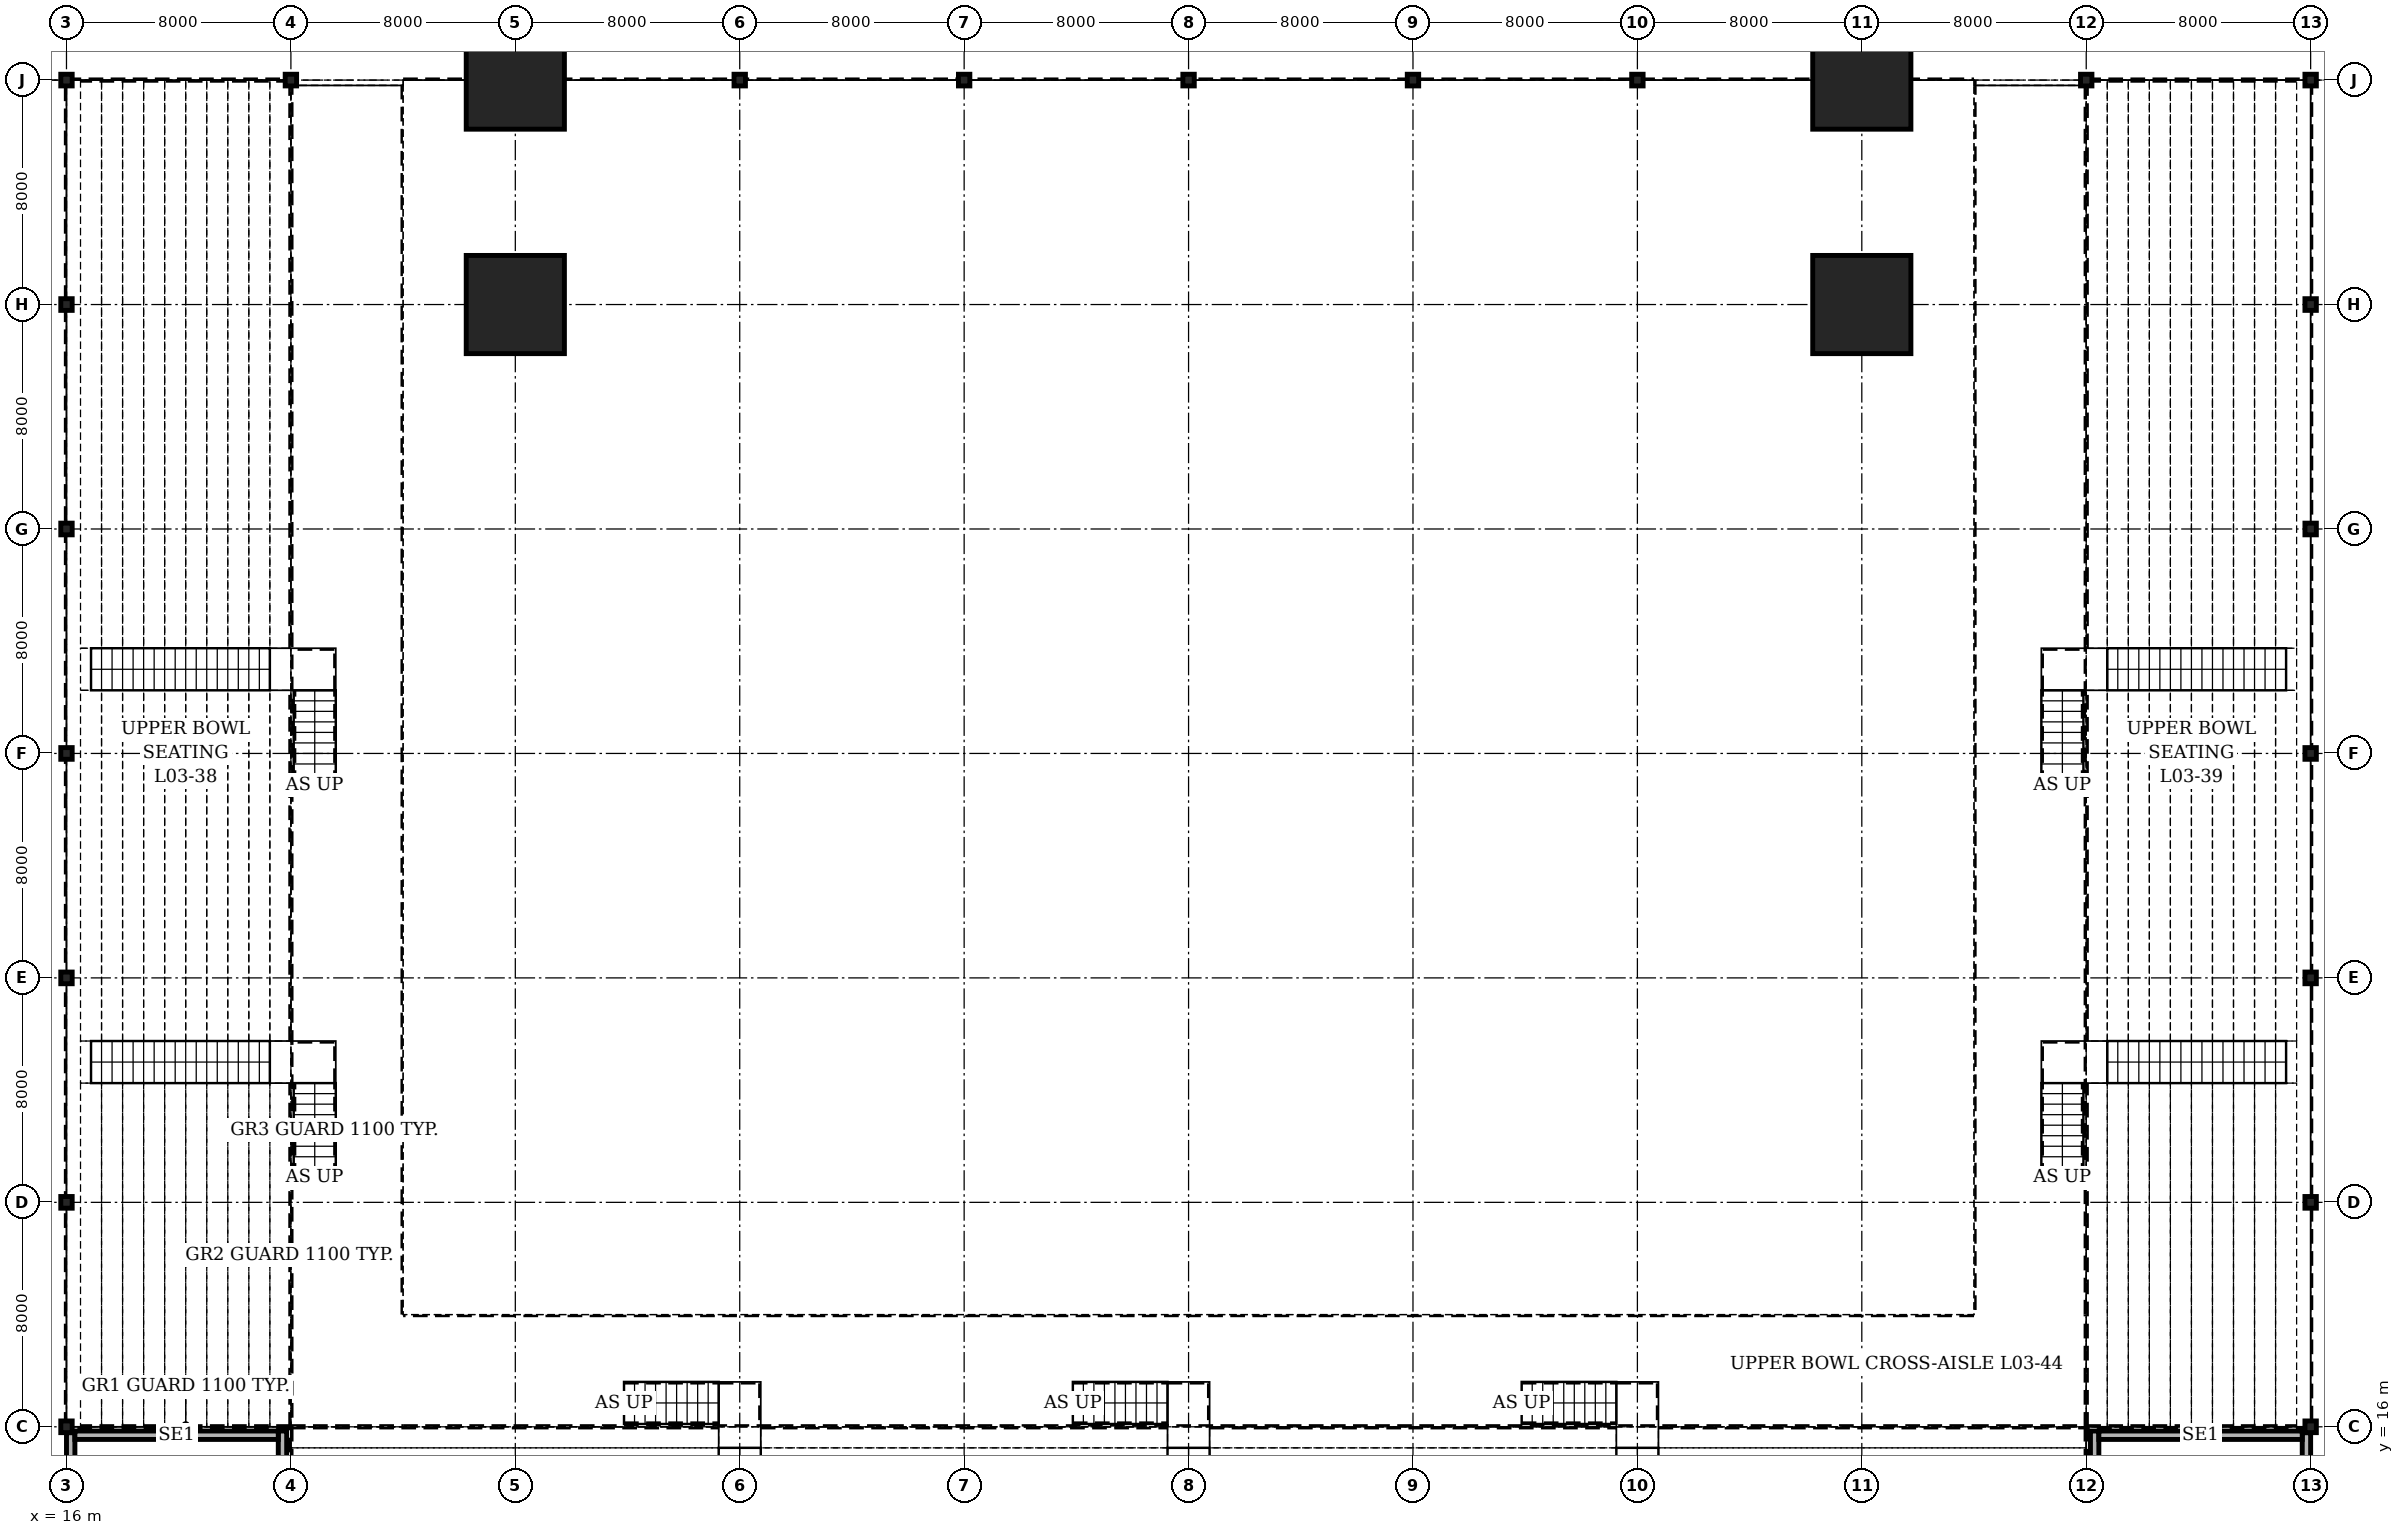
"""IFC4 building model, lengths in metres.
Left out: names, types, materials, properties, quantities, classifications, styles, units other than length and angle.
Written with IfcOpenShell. Run it as: python <this file> out.ifc"""

import sys

from ifc_helpers import new_model, si_unit, direction, frame, frame_2d, origin, origin_2d, place, context, subcontext, project, spatial, rectangle, hollow_rectangle, i_section, extrude, element, save


model = new_model("IFC4")
c1 = context("Model", 3, precision=1e-05, world=origin(), true_north=direction((0.0, 1.0)))
c2 = subcontext(c1, "Body", "Model", "MODEL_VIEW")
j1 = project(units=[si_unit("LENGTHUNIT", "METRE"), si_unit("PLANEANGLEUNIT", "RADIAN")], contexts=[c1])
p1 = place(None, origin())
s1 = spatial("IfcSite", under=j1, at=p1, CompositionType="ELEMENT")
p2 = place(p1, origin())
s2 = spatial("IfcBuilding", under=s1, at=p2, CompositionType="ELEMENT")
p3 = place(p2, frame((0.0, 0.0, 14.9)))
s3 = spatial("IfcBuildingStorey", under=s2, at=p3, CompositionType="ELEMENT", Elevation=14.9)
for number, where, z_axis, x_axis in (
    (1, (16.0, 16.0, 0.0), (0.0, 0.0, 1.0), (1.0, 0.0, 0.0)),
    (2, (16.0, 24.0, 0.0), (0.0, 0.0, 1.0), (1.0, 0.0, 0.0)),
    (3, (16.0, 32.0, 0.0), (0.0, 0.0, 1.0), (1.0, 0.0, 0.0)),
    (4, (16.0, 40.0, 0.0), (0.0, 0.0, 1.0), (1.0, 0.0, 0.0)),
    (5, (16.0, 48.0, 0.0), (0.0, 0.0, 1.0), (1.0, 0.0, 0.0)),
    (6, (16.0, 56.0, 0.0), (0.0, 0.0, 1.0), (1.0, 0.0, 0.0)),
    (7, (16.0, 64.0, 0.0), (0.0, 0.0, 1.0), (1.0, 0.0, 0.0)),
    (8, (24.0, 64.0, 0.0), (0.0, 0.0, 1.0), (1.0, 0.0, 0.0)),
):
    element("IfcColumn", number, at=place(p3, frame(where, z_axis=z_axis, x_axis=x_axis)), inside=s3, PredefinedType="COLUMN", context=c2, shape_type="SweptSolid", body=[
        extrude(i_section(OverallWidth=0.406, OverallDepth=0.417, WebThickness=0.03, FlangeThickness=0.048, at=origin_2d()), origin(), (0.0, 0.0, 1.0), 5.0),
    ])
for number, where, z_axis, x_axis in (
    (9, (32.0, 56.0, 0.0), (0.0, 0.0, 1.0), (1.0, 0.0, 0.0)),
    (10, (32.0, 64.0, 0.0), (0.0, 0.0, 1.0), (1.0, 0.0, 0.0)),
):
    element("IfcColumn", number, at=place(p3, frame(where, z_axis=z_axis, x_axis=x_axis)), inside=s3, PredefinedType="COLUMN", context=c2, shape_type="SweptSolid", body=[
        extrude(hollow_rectangle(XDim=3.5, YDim=3.5, WallThickness=0.5, at=origin_2d()), origin(), (0.0, 0.0, 1.0), 5.0),
    ])
for number, where, z_axis, x_axis in (
    (11, (40.0, 64.0, 0.0), (0.0, 0.0, 1.0), (1.0, 0.0, 0.0)),
    (12, (48.0, 64.0, 0.0), (0.0, 0.0, 1.0), (1.0, 0.0, 0.0)),
    (13, (56.0, 64.0, 0.0), (0.0, 0.0, 1.0), (1.0, 0.0, 0.0)),
    (14, (64.0, 64.0, 0.0), (0.0, 0.0, 1.0), (1.0, 0.0, 0.0)),
    (15, (72.0, 64.0, 0.0), (0.0, 0.0, 1.0), (1.0, 0.0, 0.0)),
):
    element("IfcColumn", number, at=place(p3, frame(where, z_axis=z_axis, x_axis=x_axis)), inside=s3, PredefinedType="COLUMN", context=c2, shape_type="SweptSolid", body=[
        extrude(i_section(OverallWidth=0.406, OverallDepth=0.417, WebThickness=0.03, FlangeThickness=0.048, at=origin_2d()), origin(), (0.0, 0.0, 1.0), 5.0),
    ])
for number, where, z_axis, x_axis in (
    (16, (80.0, 56.0, 0.0), (0.0, 0.0, 1.0), (1.0, 0.0, 0.0)),
    (17, (80.0, 64.0, 0.0), (0.0, 0.0, 1.0), (1.0, 0.0, 0.0)),
):
    element("IfcColumn", number, at=place(p3, frame(where, z_axis=z_axis, x_axis=x_axis)), inside=s3, PredefinedType="COLUMN", context=c2, shape_type="SweptSolid", body=[
        extrude(hollow_rectangle(XDim=3.5, YDim=3.5, WallThickness=0.5, at=origin_2d()), origin(), (0.0, 0.0, 1.0), 5.0),
    ])
for number, where, z_axis, x_axis in (
    (18, (88.0, 64.0, 0.0), (0.0, 0.0, 1.0), (1.0, 0.0, 0.0)),
    (19, (96.0, 16.0, 0.0), (0.0, 0.0, 1.0), (1.0, 0.0, 0.0)),
    (20, (96.0, 24.0, 0.0), (0.0, 0.0, 1.0), (1.0, 0.0, 0.0)),
    (21, (96.0, 32.0, 0.0), (0.0, 0.0, 1.0), (1.0, 0.0, 0.0)),
    (22, (96.0, 40.0, 0.0), (0.0, 0.0, 1.0), (1.0, 0.0, 0.0)),
    (23, (96.0, 48.0, 0.0), (0.0, 0.0, 1.0), (1.0, 0.0, 0.0)),
    (24, (96.0, 56.0, 0.0), (0.0, 0.0, 1.0), (1.0, 0.0, 0.0)),
    (25, (96.0, 64.0, 0.0), (0.0, 0.0, 1.0), (1.0, 0.0, 0.0)),
):
    element("IfcColumn", number, at=place(p3, frame(where, z_axis=z_axis, x_axis=x_axis)), inside=s3, PredefinedType="COLUMN", context=c2, shape_type="SweptSolid", body=[
        extrude(i_section(OverallWidth=0.406, OverallDepth=0.417, WebThickness=0.03, FlangeThickness=0.048, at=origin_2d()), origin(), (0.0, 0.0, 1.0), 5.0),
    ])
p4 = place(p3, frame((16.15, 5.0, 0.0), z_axis=(0.0, 0.0, 1.0), x_axis=(0.0, 1.0, 0.0)))
e26 = element("IfcWall", 26, at=p4, inside=s3, PredefinedType="SOLIDWALL", context=c2, shape_type="SweptSolid", body=[
    extrude(rectangle(XDim=10.792, YDim=0.3, at=frame_2d((5.396, 0.0))), origin(), (0.0, 0.0, 1.0), 4.8),
])
p5 = place(p3, frame((23.7, 5.0, 0.0), z_axis=(0.0, 0.0, 1.0), x_axis=(0.0, 1.0, 0.0)))
e27 = element("IfcWall", 27, at=p5, inside=s3, PredefinedType="SOLIDWALL", context=c2, shape_type="SweptSolid", body=[
    extrude(rectangle(XDim=10.85, YDim=0.3, at=frame_2d((5.425, 0.0))), origin(), (0.0, 0.0, 1.0), 4.8),
])
p6 = place(p3, frame((16.3, 15.7, 0.0), z_axis=(0.0, 0.0, 1.0), x_axis=(1.0, 0.0, 0.0)))
e28 = element("IfcWall", 28, at=p6, inside=s3, PredefinedType="SOLIDWALL", context=c2, shape_type="SweptSolid", body=[
    extrude(rectangle(XDim=7.25, YDim=0.3, at=frame_2d((3.625, 0.0))), origin(), (0.0, 0.0, 1.0), 4.8),
])
p7 = place(p3, frame((88.3, 5.0, 0.0), z_axis=(0.0, 0.0, 1.0), x_axis=(0.0, 1.0, 0.0)))
e29 = element("IfcWall", 29, at=p7, inside=s3, PredefinedType="SOLIDWALL", context=c2, shape_type="SweptSolid", body=[
    extrude(rectangle(XDim=10.85, YDim=0.3, at=frame_2d((5.425, 0.0))), origin(), (0.0, 0.0, 1.0), 4.8),
])
p8 = place(p3, frame((95.85, 5.0, 0.0), z_axis=(0.0, 0.0, 1.0), x_axis=(0.0, 1.0, 0.0)))
e30 = element("IfcWall", 30, at=p8, inside=s3, PredefinedType="SOLIDWALL", context=c2, shape_type="SweptSolid", body=[
    extrude(rectangle(XDim=10.792, YDim=0.3, at=frame_2d((5.396, 0.0))), origin(), (0.0, 0.0, 1.0), 4.8),
])
p9 = place(p3, frame((88.45, 15.7, 0.0), z_axis=(0.0, 0.0, 1.0), x_axis=(1.0, 0.0, 0.0)))
e31 = element("IfcWall", 31, at=p9, inside=s3, PredefinedType="SOLIDWALL", context=c2, shape_type="SweptSolid", body=[
    extrude(rectangle(XDim=7.25, YDim=0.3, at=frame_2d((3.625, 0.0))), origin(), (0.0, 0.0, 1.0), 4.8),
])
save(model, sys.argv[1])
